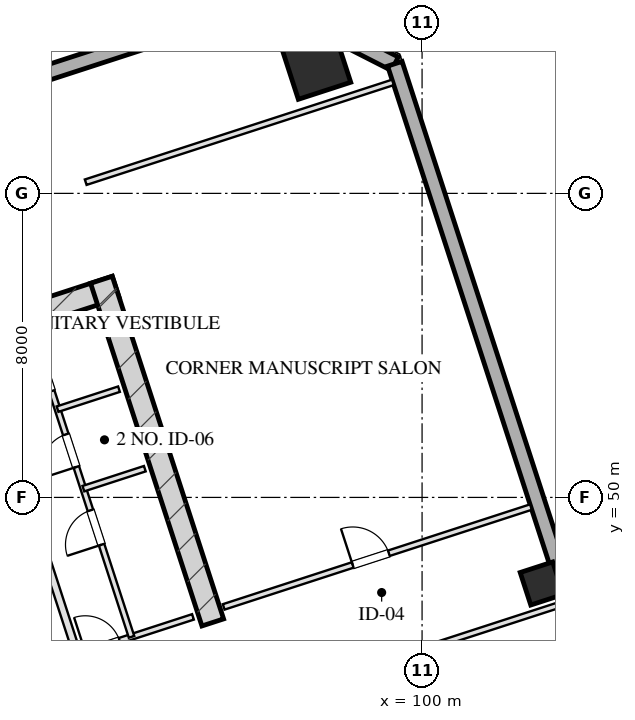
"""IFC4 building model, lengths in metres.
Left out: names, types, materials, properties, quantities, classifications, styles, units other than length and angle.
Written with IfcOpenShell. Run it as: python <this file> out.ifc"""

import sys

from ifc_helpers import new_model, si_unit, direction, frame, frame_2d, origin, origin_2d, place, context, subcontext, project, spatial, rectangle, hollow_rectangle, extrude, element, fill, save


model = new_model("IFC4")
c1 = context("Model", 3, precision=1e-05, world=origin(), true_north=direction((0.0, 1.0)))
c2 = subcontext(c1, "Body", "Model", "MODEL_VIEW")
j1 = project(units=[si_unit("LENGTHUNIT", "METRE"), si_unit("PLANEANGLEUNIT", "RADIAN")], contexts=[c1])
p1 = place(None, origin())
s1 = spatial("IfcSite", under=j1, at=p1, CompositionType="ELEMENT")
p2 = place(p1, origin())
s2 = spatial("IfcBuilding", under=s1, at=p2, CompositionType="ELEMENT")
p3 = place(p2, frame((0.0, 0.0, 103.5)))
s3 = spatial("IfcBuildingStorey", under=s2, at=p3, CompositionType="ELEMENT", Elevation=103.5)
p4 = place(p3, frame((76.344, 50.466, 0.0), z_axis=(0.0, 0.0, 1.0), x_axis=(0.951055727519, 0.309019421968, 0.0)))
e1 = element("IfcWall", 1, at=p4, inside=s3, PredefinedType="SHEAR", context=c2, shape_type="SweptSolid", body=[
    extrude(rectangle(XDim=16.4, YDim=0.6, at=frame_2d((8.2, 0.0))), origin(), (0.0, 0.0, 1.0), 3.45),
])
p5 = place(p3, frame((94.492, 46.71, 0.0), z_axis=(0.0, 0.0, 1.0), x_axis=(-0.309010370028, 0.95105866865, 0.0)))
e2 = element("IfcWall", 2, at=p5, inside=s3, PredefinedType="SHEAR", context=c2, shape_type="SweptSolid", body=[
    extrude(rectangle(XDim=9.48, YDim=0.6, at=frame_2d((4.74, 0.0))), origin(), (0.0, 0.0, 1.0), 3.45),
])
p6 = place(p3, frame((97.209, 61.388, 0.0), z_axis=(0.0, 0.0, 1.0), x_axis=(0.951056516295, 0.309016994375, 0.0)))
e3 = element("IfcColumn", 3, at=p6, inside=s3, PredefinedType="COLUMN", context=c2, shape_type="SweptSolid", body=[
    extrude(hollow_rectangle(XDim=1.45, YDim=1.45, WallThickness=0.05, at=origin_2d()), origin(), (0.0, 0.0, 1.0), 3.451),
])
p7 = place(p3, frame((103.149, 47.736, 0.0), z_axis=(0.0, 0.0, 1.0), x_axis=(0.951056516295, 0.309016994375, 0.0)))
e4 = element("IfcColumn", 4, at=p7, inside=s3, PredefinedType="COLUMN", context=c2, shape_type="SweptSolid", body=[
    extrude(hollow_rectangle(XDim=0.9, YDim=0.9, WallThickness=0.032, at=origin_2d()), origin(), (0.0, 0.0, 1.0), 3.451),
])
p8 = place(p3, frame((68.047, 53.995, 0.0), z_axis=(0.0, 0.0, 1.0), x_axis=(0.95105505922, 0.309021478754, 0.0)))
e5 = element("IfcWall", 5, at=p8, inside=s3, PredefinedType="SOLIDWALL", context=c2, shape_type="SweptSolid", body=[
    extrude(rectangle(XDim=29.4, YDim=0.4, at=frame_2d((14.7, 0.0))), origin(), (0.0, 0.0, 1.0), 2.61),
])
p9 = place(p3, frame((96.008, 63.08, 0.0), z_axis=(0.0, 0.0, 1.0), x_axis=(0.891001999643, -0.45399937955, 0.0)))
e6 = element("IfcWall", 6, at=p9, inside=s3, PredefinedType="SOLIDWALL", context=c2, shape_type="SweptSolid", body=[
    extrude(rectangle(XDim=3.677, YDim=0.4, at=frame_2d((1.839, 0.0))), origin(), (0.0, 0.0, 1.0), 2.61),
])
p10 = place(p3, frame((99.284, 61.41, 0.0), z_axis=(0.0, 0.0, 1.0), x_axis=(0.309017542002, -0.95105633836, 0.0)))
e7 = element("IfcWall", 7, at=p10, inside=s3, PredefinedType="SOLIDWALL", context=c2, shape_type="SweptSolid", body=[
    extrude(rectangle(XDim=46.4, YDim=0.4, at=frame_2d((23.2, 0.0))), origin(), (0.0, 0.0, 1.0), 2.61),
])
p11 = place(p10, frame((25.746, 0.0, 0.0)))
e8 = element("IfcOpeningElement", 8, at=p11, cuts=e7, PredefinedType="OPENING", context=c2, shape_type="SweptSolid", body=[
    extrude(rectangle(XDim=1.1, YDim=2.15, at=frame_2d((0.55, 1.075))), frame((0.0, 0.21, 0.0), z_axis=(0.0, -1.0, 0.0), x_axis=(1.0, 0.0, 0.0)), (0.0, 0.0, 1.0), 0.42),
])
p12 = place(p3, frame((90.928, 45.868, 0.0), z_axis=(0.0, 0.0, 1.0), x_axis=(-0.309042196757, 0.951048327176, 0.0)))
e9 = element("IfcWall", 9, at=p12, inside=s3, PredefinedType="PARTITIONING", context=c2, shape_type="SweptSolid", body=[
    extrude(rectangle(XDim=8.43, YDim=0.2, at=frame_2d((4.215, 0.0))), origin(), (0.0, 0.0, 1.0), 3.175),
])
p13 = place(p3, frame((90.928, 45.868, 0.0), z_axis=(0.0, 0.0, 1.0), x_axis=(0.951059297078, 0.309008435874, 0.0)))
e10 = element("IfcWall", 10, at=p13, inside=s3, PredefinedType="PARTITIONING", context=c2, shape_type="SweptSolid", body=[
    extrude(rectangle(XDim=3.2, YDim=0.15, at=frame_2d((1.6, 0.0))), origin(), (0.0, 0.0, 1.0), 3.175),
])
p14 = place(p13, frame((0.22, 0.0, 0.0)))
e11 = element("IfcOpeningElement", 11, at=p14, cuts=e10, PredefinedType="OPENING", context=c2, shape_type="SweptSolid", body=[
    extrude(rectangle(XDim=0.95, YDim=2.05, at=frame_2d((0.475, 1.025))), frame((0.0, 0.085, 0.0), z_axis=(0.0, -1.0, 0.0), x_axis=(1.0, 0.0, 0.0)), (0.0, 0.0, 1.0), 0.17),
])
p15 = place(p3, frame((92.355, 46.331, 0.0), z_axis=(0.0, 0.0, 1.0), x_axis=(-0.309007490203, 0.951059604335, 0.0)))
e12 = element("IfcWall", 12, at=p15, inside=s3, PredefinedType="PARTITIONING", context=c2, shape_type="SweptSolid", body=[
    extrude(rectangle(XDim=8.43, YDim=0.15, at=frame_2d((4.215, 0.0))), origin(), (0.0, 0.0, 1.0), 3.175),
])
p16 = place(p15, frame((2.55, 0.0, 0.0)))
e13 = element("IfcOpeningElement", 13, at=p16, cuts=e12, PredefinedType="OPENING", context=c2, shape_type="SweptSolid", body=[
    extrude(rectangle(XDim=0.95, YDim=2.05, at=frame_2d((0.475, 1.025))), frame((0.0, 0.085, 0.0), z_axis=(0.0, -1.0, 0.0), x_axis=(1.0, 0.0, 0.0)), (0.0, 0.0, 1.0), 0.17),
])
p17 = place(p15, frame((4.7, 0.0, 0.0)))
e14 = element("IfcOpeningElement", 14, at=p17, cuts=e12, PredefinedType="OPENING", context=c2, shape_type="SweptSolid", body=[
    extrude(rectangle(XDim=0.9, YDim=2.05, at=frame_2d((0.45, 1.025))), frame((0.0, 0.085, 0.0), z_axis=(0.0, -1.0, 0.0), x_axis=(1.0, 0.0, 0.0)), (0.0, 0.0, 1.0), 0.17),
])
p18 = place(p15, frame((6.8, 0.0, 0.0)))
e15 = element("IfcOpeningElement", 15, at=p18, cuts=e12, PredefinedType="OPENING", context=c2, shape_type="SweptSolid", body=[
    extrude(rectangle(XDim=0.9, YDim=2.05, at=frame_2d((0.45, 1.025))), frame((0.0, 0.085, 0.0), z_axis=(0.0, -1.0, 0.0), x_axis=(1.0, 0.0, 0.0)), (0.0, 0.0, 1.0), 0.17),
])
p19 = place(p3, frame((91.088, 50.23, 0.0), z_axis=(0.0, 0.0, 1.0), x_axis=(0.951054116971, 0.309024378638, 0.0)))
e16 = element("IfcWall", 16, at=p19, inside=s3, PredefinedType="PARTITIONING", context=c2, shape_type="SweptSolid", body=[
    extrude(rectangle(XDim=1.7, YDim=0.15, at=frame_2d((0.85, 0.0))), origin(), (0.0, 0.0, 1.0), 3.175),
])
p20 = place(p3, frame((90.408, 52.323, 0.0), z_axis=(0.0, 0.0, 1.0), x_axis=(0.951040401051, 0.309066587596, 0.0)))
e17 = element("IfcWall", 17, at=p20, inside=s3, PredefinedType="PARTITIONING", context=c2, shape_type="SweptSolid", body=[
    extrude(rectangle(XDim=1.7, YDim=0.15, at=frame_2d((0.85, 0.0))), origin(), (0.0, 0.0, 1.0), 3.175),
])
p21 = place(p3, frame((91.149, 58.294, 0.0), z_axis=(0.0, 0.0, 1.0), x_axis=(0.951062770994, 0.308997743729, 0.0)))
e18 = element("IfcWall", 18, at=p21, inside=s3, PredefinedType="PARTITIONING", context=c2, shape_type="SweptSolid", body=[
    extrude(rectangle(XDim=8.5, YDim=0.15, at=frame_2d((4.25, 0.0))), origin(), (0.0, 0.0, 1.0), 3.175),
])
p22 = place(p3, frame((94.78, 47.119, 0.0), z_axis=(0.0, 0.0, 1.0), x_axis=(0.951054329824, 0.309023723562, 0.0)))
e19 = element("IfcWall", 19, at=p22, inside=s3, PredefinedType="PARTITIONING", context=c2, shape_type="SweptSolid", body=[
    extrude(rectangle(XDim=8.5, YDim=0.15, at=frame_2d((4.25, 0.0))), origin(), (0.0, 0.0, 1.0), 3.175),
])
p23 = place(p22, frame((3.57, 0.0, 0.0)))
e20 = element("IfcOpeningElement", 20, at=p23, cuts=e19, PredefinedType="OPENING", context=c2, shape_type="SweptSolid", body=[
    extrude(rectangle(XDim=1.0, YDim=2.05, at=frame_2d((0.5, 1.025))), frame((0.0, 0.085, 0.0), z_axis=(0.0, -1.0, 0.0), x_axis=(1.0, 0.0, 0.0)), (0.0, 0.0, 1.0), 0.17),
])
p24 = place(p3, frame((90.567, 42.933, 0.0), z_axis=(0.0, 0.0, 1.0), x_axis=(0.951058377365, 0.309011266531, 0.0)))
e21 = element("IfcWall", 21, at=p24, inside=s3, PredefinedType="PARTITIONING", context=c2, shape_type="SweptSolid", body=[
    extrude(rectangle(XDim=13.8, YDim=0.15, at=frame_2d((6.9, 0.0))), origin(), (0.0, 0.0, 1.0), 3.175),
])
p25 = place(p14, origin())
e22 = element("IfcDoor", 22, at=p25, inside=s3, OperationType="SINGLE_SWING_LEFT", PredefinedType="DOOR", context=c2, shape_type="SweptSolid", body=[
    extrude(rectangle(XDim=0.95, YDim=2.05, at=frame_2d((0.475, 1.025))), frame((0.0, 0.025, 0.0), z_axis=(0.0, -1.0, 0.0), x_axis=(1.0, 0.0, 0.0)), (0.0, 0.0, 1.0), 0.05),
])
fill(e11, e22)
p26 = place(p16, origin())
e23 = element("IfcDoor", 23, at=p26, inside=s3, OperationType="SINGLE_SWING_LEFT", PredefinedType="DOOR", context=c2, shape_type="SweptSolid", body=[
    extrude(rectangle(XDim=0.95, YDim=2.05, at=frame_2d((0.475, 1.025))), frame((0.0, 0.025, 0.0), z_axis=(0.0, -1.0, 0.0), x_axis=(1.0, 0.0, 0.0)), (0.0, 0.0, 1.0), 0.05),
])
fill(e13, e23)
p27 = place(p17, origin())
e24 = element("IfcDoor", 24, at=p27, inside=s3, OperationType="SINGLE_SWING_LEFT", PredefinedType="DOOR", context=c2, shape_type="SweptSolid", body=[
    extrude(rectangle(XDim=0.9, YDim=2.05, at=frame_2d((0.45, 1.025))), frame((0.0, 0.025, 0.0), z_axis=(0.0, -1.0, 0.0), x_axis=(1.0, 0.0, 0.0)), (0.0, 0.0, 1.0), 0.05),
])
fill(e14, e24)
p28 = place(p18, origin())
e25 = element("IfcDoor", 25, at=p28, inside=s3, OperationType="SINGLE_SWING_RIGHT", PredefinedType="DOOR", context=c2, shape_type="SweptSolid", body=[
    extrude(rectangle(XDim=0.9, YDim=2.05, at=frame_2d((0.45, 1.025))), frame((0.0, 0.025, 0.0), z_axis=(0.0, -1.0, 0.0), x_axis=(1.0, 0.0, 0.0)), (0.0, 0.0, 1.0), 0.05),
])
fill(e15, e25)
p29 = place(p23, origin())
e26 = element("IfcDoor", 26, at=p29, inside=s3, OperationType="SINGLE_SWING_LEFT", PredefinedType="DOOR", context=c2, shape_type="SweptSolid", body=[
    extrude(rectangle(XDim=1.0, YDim=2.05, at=frame_2d((0.5, 1.025))), frame((0.0, 0.025, 0.0), z_axis=(0.0, -1.0, 0.0), x_axis=(1.0, 0.0, 0.0)), (0.0, 0.0, 1.0), 0.05),
])
fill(e20, e26)
save(model, sys.argv[1])
